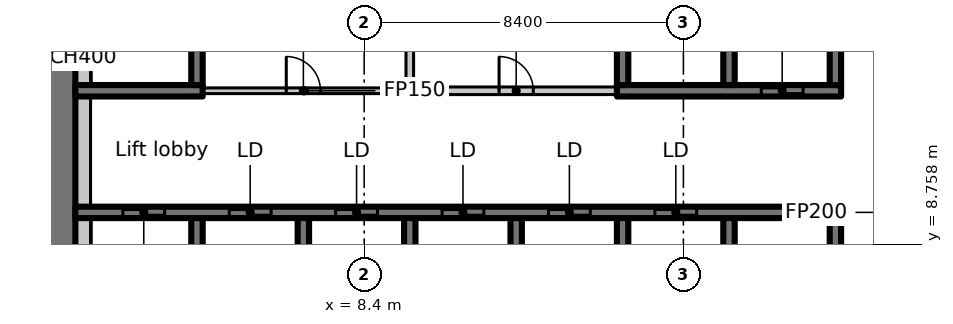
"""IFC4 building model, lengths in metres.
Left out: names, types, materials, properties, quantities, classifications, styles, units other than length and angle.
Written with IfcOpenShell. Run it as: python <this file> out.ifc"""

import sys

from ifc_helpers import new_model, si_unit, direction, frame, frame_2d, origin, place, context, subcontext, project, spatial, rectangle, extrude, element, fill, save


model = new_model("IFC4")
c1 = context("Model", 3, precision=1e-05, world=origin(), true_north=direction((0.0, 1.0)))
c2 = subcontext(c1, "Body", "Model", "MODEL_VIEW")
j1 = project(units=[si_unit("LENGTHUNIT", "METRE"), si_unit("PLANEANGLEUNIT", "RADIAN")], contexts=[c1])
p1 = place(None, origin())
s1 = spatial("IfcSite", under=j1, at=p1, CompositionType="ELEMENT")
p2 = place(p1, origin())
s2 = spatial("IfcBuilding", under=s1, at=p2, CompositionType="ELEMENT")
p3 = place(p2, frame((0.0, 0.0, 120.5)))
s3 = spatial("IfcBuildingStorey", under=s2, at=p3, CompositionType="ELEMENT", Elevation=120.5)
p4 = place(p3, frame((0.4, 7.136, 0.0), z_axis=(0.0, 0.0, 1.0), x_axis=(0.0, 1.0, 0.0)))
e1 = element("IfcWall", 1, at=p4, inside=s3, PredefinedType="SHEAR", context=c2, shape_type="SweptSolid", body=[
    extrude(rectangle(XDim=8.864, YDim=0.8, at=frame_2d((4.432, 0.0))), origin(), (0.0, 0.0, 1.0), 3.35),
])
p5 = place(p3, frame((0.8, 9.6, 0.0), z_axis=(0.0, 0.0, 1.0), x_axis=(1.0, 0.0, 0.0)))
e2 = element("IfcWall", 2, at=p5, inside=s3, PredefinedType="SHEAR", context=c2, shape_type="SweptSolid", body=[
    extrude(rectangle(XDim=20.15, YDim=0.3, at=frame_2d((10.075, 0.0))), origin(), (0.0, 0.0, 1.0), 3.35),
])
p6 = place(p5, frame((1.25, 0.0, 0.0)))
e3 = element("IfcOpeningElement", 3, at=p6, cuts=e2, PredefinedType="OPENING", context=c2, shape_type="SweptSolid", body=[
    extrude(rectangle(XDim=1.1, YDim=2.3, at=frame_2d((0.55, 1.15))), frame((0.0, 0.16, 0.0), z_axis=(0.0, -1.0, 0.0), x_axis=(1.0, 0.0, 0.0)), (0.0, 0.0, 1.0), 0.32),
])
p7 = place(p5, frame((4.05, 0.0, 0.0)))
e4 = element("IfcOpeningElement", 4, at=p7, cuts=e2, PredefinedType="OPENING", context=c2, shape_type="SweptSolid", body=[
    extrude(rectangle(XDim=1.1, YDim=2.3, at=frame_2d((0.55, 1.15))), frame((0.0, 0.16, 0.0), z_axis=(0.0, -1.0, 0.0), x_axis=(1.0, 0.0, 0.0)), (0.0, 0.0, 1.0), 0.32),
])
p8 = place(p5, frame((6.85, 0.0, 0.0)))
e5 = element("IfcOpeningElement", 5, at=p8, cuts=e2, PredefinedType="OPENING", context=c2, shape_type="SweptSolid", body=[
    extrude(rectangle(XDim=1.1, YDim=2.3, at=frame_2d((0.55, 1.15))), frame((0.0, 0.16, 0.0), z_axis=(0.0, -1.0, 0.0), x_axis=(1.0, 0.0, 0.0)), (0.0, 0.0, 1.0), 0.32),
])
p9 = place(p5, frame((9.65, 0.0, 0.0)))
e6 = element("IfcOpeningElement", 6, at=p9, cuts=e2, PredefinedType="OPENING", context=c2, shape_type="SweptSolid", body=[
    extrude(rectangle(XDim=1.1, YDim=2.3, at=frame_2d((0.55, 1.15))), frame((0.0, 0.16, 0.0), z_axis=(0.0, -1.0, 0.0), x_axis=(1.0, 0.0, 0.0)), (0.0, 0.0, 1.0), 0.32),
])
p10 = place(p5, frame((12.45, 0.0, 0.0)))
e7 = element("IfcOpeningElement", 7, at=p10, cuts=e2, PredefinedType="OPENING", context=c2, shape_type="SweptSolid", body=[
    extrude(rectangle(XDim=1.1, YDim=2.3, at=frame_2d((0.55, 1.15))), frame((0.0, 0.16, 0.0), z_axis=(0.0, -1.0, 0.0), x_axis=(1.0, 0.0, 0.0)), (0.0, 0.0, 1.0), 0.32),
])
p11 = place(p5, frame((15.25, 0.0, 0.0)))
e8 = element("IfcOpeningElement", 8, at=p11, cuts=e2, PredefinedType="OPENING", context=c2, shape_type="SweptSolid", body=[
    extrude(rectangle(XDim=1.1, YDim=2.3, at=frame_2d((0.55, 1.15))), frame((0.0, 0.16, 0.0), z_axis=(0.0, -1.0, 0.0), x_axis=(1.0, 0.0, 0.0)), (0.0, 0.0, 1.0), 0.32),
])
for number, where, z_axis, x_axis in (
    (9, (4.0, 7.15, 0.0), (0.0, 0.0, 1.0), (0.0, 1.0, 0.0)),
    (10, (6.8, 7.15, 0.0), (0.0, 0.0, 1.0), (0.0, 1.0, 0.0)),
    (11, (9.6, 7.15, 0.0), (0.0, 0.0, 1.0), (0.0, 1.0, 0.0)),
    (12, (12.4, 7.15, 0.0), (0.0, 0.0, 1.0), (0.0, 1.0, 0.0)),
    (13, (15.2, 7.15, 0.0), (0.0, 0.0, 1.0), (0.0, 1.0, 0.0)),
    (14, (18.0, 7.15, 0.0), (0.0, 0.0, 1.0), (0.0, 1.0, 0.0)),
    (15, (20.8, 7.15, 0.0), (0.0, 0.0, 1.0), (0.0, 1.0, 0.0)),
):
    element("IfcWall", number, at=place(p3, frame(where, z_axis=z_axis, x_axis=x_axis)), inside=s3, PredefinedType="SHEAR", context=c2, shape_type="SweptSolid", body=[
        extrude(rectangle(XDim=2.3, YDim=0.3, at=frame_2d((1.15, 0.0))), origin(), (0.0, 0.0, 1.0), 3.35),
    ])
p12 = place(p3, frame((0.8, 12.8, 0.0), z_axis=(0.0, 0.0, 1.0), x_axis=(1.0, 0.0, 0.0)))
e16 = element("IfcWall", 16, at=p12, inside=s3, PredefinedType="SHEAR", context=c2, shape_type="SweptSolid", body=[
    extrude(rectangle(XDim=3.35, YDim=0.3, at=frame_2d((1.675, 0.0))), origin(), (0.0, 0.0, 1.0), 3.35),
])
p13 = place(p3, frame((4.0, 12.95, 0.0), z_axis=(0.0, 0.0, 1.0), x_axis=(0.0, 1.0, 0.0)))
e17 = element("IfcWall", 17, at=p13, inside=s3, PredefinedType="SHEAR", context=c2, shape_type="SweptSolid", body=[
    extrude(rectangle(XDim=3.05, YDim=0.3, at=frame_2d((1.525, 0.0))), origin(), (0.0, 0.0, 1.0), 3.35),
])
p14 = place(p3, frame((15.05, 12.8, 0.0), z_axis=(0.0, 0.0, 1.0), x_axis=(1.0, 0.0, 0.0)))
e18 = element("IfcWall", 18, at=p14, inside=s3, PredefinedType="SHEAR", context=c2, shape_type="SweptSolid", body=[
    extrude(rectangle(XDim=5.9, YDim=0.3, at=frame_2d((2.95, 0.0))), origin(), (0.0, 0.0, 1.0), 3.35),
])
p15 = place(p14, frame((3.8, 0.0, 0.0)))
e19 = element("IfcOpeningElement", 19, at=p15, cuts=e18, PredefinedType="OPENING", context=c2, shape_type="SweptSolid", body=[
    extrude(rectangle(XDim=1.1, YDim=2.3, at=frame_2d((0.55, 1.15))), frame((0.0, 0.16, 0.0), z_axis=(0.0, -1.0, 0.0), x_axis=(1.0, 0.0, 0.0)), (0.0, 0.0, 1.0), 0.32),
])
for number, where, z_axis, x_axis in (
    (20, (15.2, 12.95, 0.0), (0.0, 0.0, 1.0), (0.0, 1.0, 0.0)),
    (21, (18.0, 12.95, 0.0), (0.0, 0.0, 1.0), (0.0, 1.0, 0.0)),
    (22, (20.8, 12.95, 0.0), (0.0, 0.0, 1.0), (0.0, 1.0, 0.0)),
):
    element("IfcWall", number, at=place(p3, frame(where, z_axis=z_axis, x_axis=x_axis)), inside=s3, PredefinedType="SHEAR", context=c2, shape_type="SweptSolid", body=[
        extrude(rectangle(XDim=3.05, YDim=0.3, at=frame_2d((1.525, 0.0))), origin(), (0.0, 0.0, 1.0), 3.35),
    ])
p16 = place(p3, frame((9.6, 15.588, 0.0), z_axis=(0.0, 0.0, 1.0), x_axis=(0.0, -1.0, 0.0)))
e23 = element("IfcWall", 23, at=p16, inside=s3, PredefinedType="PARTITIONING", context=c2, shape_type="SweptSolid", body=[
    extrude(rectangle(XDim=2.788, YDim=0.2, at=frame_2d((1.394, 0.0))), origin(), (0.0, 0.0, 1.0), 3.35),
])
p17 = place(p3, frame((9.7, 12.8, 0.0), z_axis=(0.0, 0.0, 1.0), x_axis=(1.0, 0.0, 0.0)))
e24 = element("IfcWall", 24, at=p17, inside=s3, PredefinedType="PARTITIONING", context=c2, shape_type="SweptSolid", body=[
    extrude(rectangle(XDim=5.338, YDim=0.2, at=frame_2d((2.669, 0.0))), origin(), (0.0, 0.0, 1.0), 3.35),
])
p18 = place(p17, frame((2.25, 0.0, 0.0)))
e25 = element("IfcOpeningElement", 25, at=p18, cuts=e24, PredefinedType="OPENING", context=c2, shape_type="SweptSolid", body=[
    extrude(rectangle(XDim=0.9, YDim=2.1, at=frame_2d((0.45, 1.05))), frame((0.0, 0.11, 0.0), z_axis=(0.0, -1.0, 0.0), x_axis=(1.0, 0.0, 0.0)), (0.0, 0.0, 1.0), 0.22),
])
p19 = place(p3, frame((4.162, 12.8, 0.0), z_axis=(0.0, 0.0, 1.0), x_axis=(1.0, 0.0, 0.0)))
e26 = element("IfcWall", 26, at=p19, inside=s3, PredefinedType="PARTITIONING", context=c2, shape_type="SweptSolid", body=[
    extrude(rectangle(XDim=5.338, YDim=0.15, at=frame_2d((2.669, 0.0))), origin(), (0.0, 0.0, 1.0), 3.35),
])
p20 = place(p19, frame((2.188, 0.0, 0.0)))
e27 = element("IfcOpeningElement", 27, at=p20, cuts=e26, PredefinedType="OPENING", context=c2, shape_type="SweptSolid", body=[
    extrude(rectangle(XDim=0.9, YDim=2.1, at=frame_2d((0.45, 1.05))), frame((0.0, 0.085, 0.0), z_axis=(0.0, -1.0, 0.0), x_axis=(1.0, 0.0, 0.0)), (0.0, 0.0, 1.0), 0.17),
])
p21 = place(p3, frame((1.0, 7.15, 0.0), z_axis=(0.0, 0.0, 1.0), x_axis=(0.0, 1.0, 0.0)))
e28 = element("IfcWall", 28, at=p21, inside=s3, PredefinedType="PARTITIONING", context=c2, shape_type="SweptSolid", body=[
    extrude(rectangle(XDim=2.3, YDim=0.4, at=frame_2d((1.15, 0.0))), origin(), (0.0, 0.0, 1.0), 3.35),
])
p22 = place(p3, frame((1.0, 9.75, 0.0), z_axis=(0.0, 0.0, 1.0), x_axis=(0.0, 1.0, 0.0)))
e29 = element("IfcWall", 29, at=p22, inside=s3, PredefinedType="PARTITIONING", context=c2, shape_type="SweptSolid", body=[
    extrude(rectangle(XDim=2.9, YDim=0.4, at=frame_2d((1.45, 0.0))), origin(), (0.0, 0.0, 1.0), 3.35),
])
p23 = place(p3, frame((1.0, 12.95, 0.0), z_axis=(0.0, 0.0, 1.0), x_axis=(0.0, 1.0, 0.0)))
e30 = element("IfcWall", 30, at=p23, inside=s3, PredefinedType="PARTITIONING", context=c2, shape_type="SweptSolid", body=[
    extrude(rectangle(XDim=2.65, YDim=0.4, at=frame_2d((1.325, 0.0))), origin(), (0.0, 0.0, 1.0), 3.35),
])
p24 = place(p6, origin())
e31 = element("IfcDoor", 31, at=p24, inside=s3, OperationType="SLIDING_TO_LEFT", PredefinedType="DOOR", context=c2, shape_type="SweptSolid", body=[
    extrude(rectangle(XDim=1.1, YDim=2.3, at=frame_2d((0.55, 1.15))), frame((0.0, 0.025, 0.0), z_axis=(0.0, -1.0, 0.0), x_axis=(1.0, 0.0, 0.0)), (0.0, 0.0, 1.0), 0.05),
])
fill(e3, e31)
p25 = place(p7, origin())
e32 = element("IfcDoor", 32, at=p25, inside=s3, OperationType="SLIDING_TO_LEFT", PredefinedType="DOOR", context=c2, shape_type="SweptSolid", body=[
    extrude(rectangle(XDim=1.1, YDim=2.3, at=frame_2d((0.55, 1.15))), frame((0.0, 0.025, 0.0), z_axis=(0.0, -1.0, 0.0), x_axis=(1.0, 0.0, 0.0)), (0.0, 0.0, 1.0), 0.05),
])
fill(e4, e32)
p26 = place(p8, origin())
e33 = element("IfcDoor", 33, at=p26, inside=s3, OperationType="SLIDING_TO_LEFT", PredefinedType="DOOR", context=c2, shape_type="SweptSolid", body=[
    extrude(rectangle(XDim=1.1, YDim=2.3, at=frame_2d((0.55, 1.15))), frame((0.0, 0.025, 0.0), z_axis=(0.0, -1.0, 0.0), x_axis=(1.0, 0.0, 0.0)), (0.0, 0.0, 1.0), 0.05),
])
fill(e5, e33)
p27 = place(p9, origin())
e34 = element("IfcDoor", 34, at=p27, inside=s3, OperationType="SLIDING_TO_LEFT", PredefinedType="DOOR", context=c2, shape_type="SweptSolid", body=[
    extrude(rectangle(XDim=1.1, YDim=2.3, at=frame_2d((0.55, 1.15))), frame((0.0, 0.025, 0.0), z_axis=(0.0, -1.0, 0.0), x_axis=(1.0, 0.0, 0.0)), (0.0, 0.0, 1.0), 0.05),
])
fill(e6, e34)
p28 = place(p10, origin())
e35 = element("IfcDoor", 35, at=p28, inside=s3, OperationType="SLIDING_TO_LEFT", PredefinedType="DOOR", context=c2, shape_type="SweptSolid", body=[
    extrude(rectangle(XDim=1.1, YDim=2.3, at=frame_2d((0.55, 1.15))), frame((0.0, 0.025, 0.0), z_axis=(0.0, -1.0, 0.0), x_axis=(1.0, 0.0, 0.0)), (0.0, 0.0, 1.0), 0.05),
])
fill(e7, e35)
p29 = place(p11, origin())
e36 = element("IfcDoor", 36, at=p29, inside=s3, OperationType="SLIDING_TO_LEFT", PredefinedType="DOOR", context=c2, shape_type="SweptSolid", body=[
    extrude(rectangle(XDim=1.1, YDim=2.3, at=frame_2d((0.55, 1.15))), frame((0.0, 0.025, 0.0), z_axis=(0.0, -1.0, 0.0), x_axis=(1.0, 0.0, 0.0)), (0.0, 0.0, 1.0), 0.05),
])
fill(e8, e36)
p30 = place(p15, origin())
e37 = element("IfcDoor", 37, at=p30, inside=s3, OperationType="SLIDING_TO_LEFT", PredefinedType="DOOR", context=c2, shape_type="SweptSolid", body=[
    extrude(rectangle(XDim=1.1, YDim=2.3, at=frame_2d((0.55, 1.15))), frame((0.0, 0.025, 0.0), z_axis=(0.0, -1.0, 0.0), x_axis=(1.0, 0.0, 0.0)), (0.0, 0.0, 1.0), 0.05),
])
fill(e19, e37)
p31 = place(p20, origin())
e38 = element("IfcDoor", 38, at=p31, inside=s3, OperationType="SINGLE_SWING_RIGHT", PredefinedType="DOOR", context=c2, shape_type="SweptSolid", body=[
    extrude(rectangle(XDim=0.9, YDim=2.1, at=frame_2d((0.45, 1.05))), frame((0.0, 0.025, 0.0), z_axis=(0.0, -1.0, 0.0), x_axis=(1.0, 0.0, 0.0)), (0.0, 0.0, 1.0), 0.05),
])
fill(e27, e38)
p32 = place(p18, origin())
e39 = element("IfcDoor", 39, at=p32, inside=s3, OperationType="SINGLE_SWING_LEFT", PredefinedType="DOOR", context=c2, shape_type="SweptSolid", body=[
    extrude(rectangle(XDim=0.9, YDim=2.1, at=frame_2d((0.45, 1.05))), frame((0.0, 0.025, 0.0), z_axis=(0.0, -1.0, 0.0), x_axis=(1.0, 0.0, 0.0)), (0.0, 0.0, 1.0), 0.05),
])
fill(e25, e39)
save(model, sys.argv[1])
